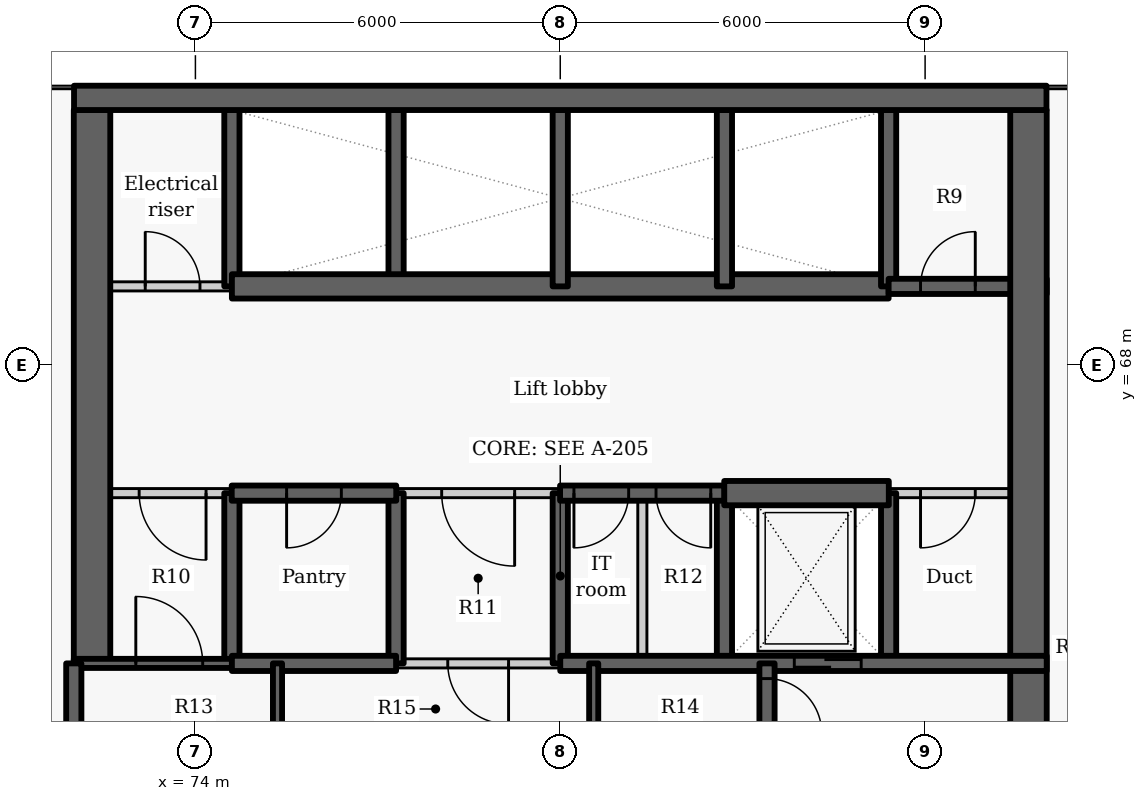
"""IFC4 building model, lengths in metres.
Left out: names, types, materials, properties, quantities, classifications, styles, units other than length and angle.
Written with IfcOpenShell. Run it as: python <this file> out.ifc"""

import sys

from ifc_helpers import new_model, si_unit, direction, frame, frame_2d, origin, place, context, subcontext, project, spatial, rectangle, extrude, element, fill, save


model = new_model("IFC4")
c1 = context("Model", 3, precision=1e-05, world=origin(), true_north=direction((0.0, 1.0)))
c2 = subcontext(c1, "Body", "Model", "MODEL_VIEW")
j1 = project(units=[si_unit("LENGTHUNIT", "METRE"), si_unit("PLANEANGLEUNIT", "RADIAN")], contexts=[c1])
p1 = place(None, origin())
s1 = spatial("IfcSite", under=j1, at=p1, CompositionType="ELEMENT")
p2 = place(p1, origin())
s2 = spatial("IfcBuilding", under=s1, at=p2, CompositionType="ELEMENT")
p3 = place(p2, frame((0.0, 0.0, 19.8)))
s3 = spatial("IfcBuildingStorey", under=s2, at=p3, CompositionType="ELEMENT", Elevation=19.8)
p4 = place(p3, frame((74.6, 63.1, -0.3), z_axis=(0.0, 0.0, 1.0), x_axis=(0.0, 1.0, 0.0)))
e1 = element("IfcWall", 1, at=p4, inside=s3, PredefinedType="SHEAR", context=c2, shape_type="SweptSolid", body=[
    extrude(rectangle(XDim=2.8, YDim=0.25, at=frame_2d((1.4, 0.0))), origin(), (0.0, 0.0, 1.0), 4.2),
])
p5 = place(p3, frame((74.6, 69.3, -0.3), z_axis=(0.0, 0.0, 1.0), x_axis=(0.0, 1.0, 0.0)))
e2 = element("IfcWall", 2, at=p5, inside=s3, PredefinedType="SHEAR", context=c2, shape_type="SweptSolid", body=[
    extrude(rectangle(XDim=2.9, YDim=0.25, at=frame_2d((1.45, 0.0))), origin(), (0.0, 0.0, 1.0), 4.2),
])
p6 = place(p3, frame((72.0, 69.3, 0.0), z_axis=(0.0, 0.0, 1.0), x_axis=(1.0, 0.0, 0.0)))
e3 = element("IfcWall", 3, at=p6, inside=s3, PredefinedType="PARTITIONING", context=c2, shape_type="SweptSolid", body=[
    extrude(rectangle(XDim=2.6, YDim=0.15, at=frame_2d((1.3, 0.0))), origin(), (0.0, 0.0, 1.0), 3.9),
])
p7 = place(p6, frame((1.175, 0.0, 0.0)))
e4 = element("IfcOpeningElement", 4, at=p7, cuts=e3, PredefinedType="OPENING", context=c2, shape_type="SweptSolid", body=[
    extrude(rectangle(XDim=0.9, YDim=2.1, at=frame_2d((0.45, 1.05))), frame((0.0, 0.085, 0.0), z_axis=(0.0, -1.0, 0.0), x_axis=(1.0, 0.0, 0.0)), (0.0, 0.0, 1.0), 0.17),
])
p8 = place(p3, frame((72.3, 63.1, -0.3), z_axis=(0.0, 0.0, 1.0), x_axis=(0.0, 1.0, 0.0)))
e5 = element("IfcWall", 5, at=p8, inside=s3, PredefinedType="SHEAR", context=c2, shape_type="SweptSolid", body=[
    extrude(rectangle(XDim=9.1, YDim=0.6, at=frame_2d((4.55, 0.0))), origin(), (0.0, 0.0, 1.0), 4.2),
])
p9 = place(p3, frame((77.3, 63.1, -0.3), z_axis=(0.0, 0.0, 1.0), x_axis=(0.0, 1.0, 0.0)))
e6 = element("IfcWall", 6, at=p9, inside=s3, PredefinedType="SHEAR", context=c2, shape_type="SweptSolid", body=[
    extrude(rectangle(XDim=2.8, YDim=0.25, at=frame_2d((1.4, 0.0))), origin(), (0.0, 0.0, 1.0), 4.2),
])
p10 = place(p3, frame((77.3, 69.3, -0.3), z_axis=(0.0, 0.0, 1.0), x_axis=(0.0, 1.0, 0.0)))
e7 = element("IfcWall", 7, at=p10, inside=s3, PredefinedType="SHEAR", context=c2, shape_type="SweptSolid", body=[
    extrude(rectangle(XDim=2.9, YDim=0.25, at=frame_2d((1.45, 0.0))), origin(), (0.0, 0.0, 1.0), 4.2),
])
p11 = place(p3, frame((74.6, 69.3, -0.3), z_axis=(0.0, 0.0, 1.0), x_axis=(1.0, 0.0, 0.0)))
e8 = element("IfcWall", 8, at=p11, inside=s3, PredefinedType="SHEAR", context=c2, shape_type="SweptSolid", body=[
    extrude(rectangle(XDim=10.8, YDim=0.4, at=frame_2d((5.4, 0.0))), origin(), (0.0, 0.0, 1.0), 4.2),
])
p12 = place(p3, frame((80.0, 63.1, -0.3), z_axis=(0.0, 0.0, 1.0), x_axis=(0.0, 1.0, 0.0)))
e9 = element("IfcWall", 9, at=p12, inside=s3, PredefinedType="SHEAR", context=c2, shape_type="SweptSolid", body=[
    extrude(rectangle(XDim=2.8, YDim=0.25, at=frame_2d((1.4, 0.0))), origin(), (0.0, 0.0, 1.0), 4.2),
])
p13 = place(p3, frame((80.0, 69.3, -0.3), z_axis=(0.0, 0.0, 1.0), x_axis=(0.0, 1.0, 0.0)))
e10 = element("IfcWall", 10, at=p13, inside=s3, PredefinedType="SHEAR", context=c2, shape_type="SweptSolid", body=[
    extrude(rectangle(XDim=2.9, YDim=0.25, at=frame_2d((1.45, 0.0))), origin(), (0.0, 0.0, 1.0), 4.2),
])
p14 = place(p3, frame((82.7, 63.1, -0.3), z_axis=(0.0, 0.0, 1.0), x_axis=(0.0, 1.0, 0.0)))
e11 = element("IfcWall", 11, at=p14, inside=s3, PredefinedType="SHEAR", context=c2, shape_type="SweptSolid", body=[
    extrude(rectangle(XDim=2.8, YDim=0.25, at=frame_2d((1.4, 0.0))), origin(), (0.0, 0.0, 1.0), 4.2),
])
p15 = place(p3, frame((82.7, 69.3, -0.3), z_axis=(0.0, 0.0, 1.0), x_axis=(0.0, 1.0, 0.0)))
e12 = element("IfcWall", 12, at=p15, inside=s3, PredefinedType="SHEAR", context=c2, shape_type="SweptSolid", body=[
    extrude(rectangle(XDim=2.9, YDim=0.25, at=frame_2d((1.45, 0.0))), origin(), (0.0, 0.0, 1.0), 4.2),
])
p16 = place(p3, frame((85.4, 63.1, -0.3), z_axis=(0.0, 0.0, 1.0), x_axis=(0.0, 1.0, 0.0)))
e13 = element("IfcWall", 13, at=p16, inside=s3, PredefinedType="SHEAR", context=c2, shape_type="SweptSolid", body=[
    extrude(rectangle(XDim=2.8, YDim=0.25, at=frame_2d((1.4, 0.0))), origin(), (0.0, 0.0, 1.0), 4.2),
])
p17 = place(p3, frame((85.4, 69.3, -0.3), z_axis=(0.0, 0.0, 1.0), x_axis=(0.0, 1.0, 0.0)))
e14 = element("IfcWall", 14, at=p17, inside=s3, PredefinedType="SHEAR", context=c2, shape_type="SweptSolid", body=[
    extrude(rectangle(XDim=2.9, YDim=0.25, at=frame_2d((1.45, 0.0))), origin(), (0.0, 0.0, 1.0), 4.2),
])
p18 = place(p3, frame((85.4, 69.3, -0.3), z_axis=(0.0, 0.0, 1.0), x_axis=(1.0, 0.0, 0.0)))
e15 = element("IfcWall", 15, at=p18, inside=s3, PredefinedType="SHEAR", context=c2, shape_type="SweptSolid", body=[
    extrude(rectangle(XDim=2.6, YDim=0.25, at=frame_2d((1.3, 0.0))), origin(), (0.0, 0.0, 1.0), 4.2),
])
p19 = place(p18, frame((0.525, 0.0, 0.3)))
e16 = element("IfcOpeningElement", 16, at=p19, cuts=e15, PredefinedType="OPENING", context=c2, shape_type="SweptSolid", body=[
    extrude(rectangle(XDim=0.9, YDim=2.1, at=frame_2d((0.45, 1.05))), frame((0.0, 0.135, 0.0), z_axis=(0.0, -1.0, 0.0), x_axis=(1.0, 0.0, 0.0)), (0.0, 0.0, 1.0), 0.27),
])
p20 = place(p3, frame((87.7, 72.2, -0.3), z_axis=(0.0, 0.0, 1.0), x_axis=(0.0, -1.0, 0.0)))
e17 = element("IfcWall", 17, at=p20, inside=s3, PredefinedType="SHEAR", context=c2, shape_type="SweptSolid", body=[
    extrude(rectangle(XDim=15.6, YDim=0.6, at=frame_2d((7.8, 0.0))), origin(), (0.0, 0.0, 1.0), 4.2),
])
p21 = place(p20, frame((11.8, 0.0, 0.3)))
e18 = element("IfcOpeningElement", 18, at=p21, cuts=e17, PredefinedType="OPENING", context=c2, shape_type="SweptSolid", body=[
    extrude(rectangle(XDim=1.1, YDim=2.1, at=frame_2d((0.55, 1.05))), frame((0.0, 0.31, 0.0), z_axis=(0.0, -1.0, 0.0), x_axis=(1.0, 0.0, 0.0)), (0.0, 0.0, 1.0), 0.62),
])
p22 = place(p3, frame((74.603, 65.9, 0.0), z_axis=(0.0, 0.0, 1.0), x_axis=(-1.0, 0.0, 0.0)))
e19 = element("IfcWall", 19, at=p22, inside=s3, PredefinedType="PARTITIONING", context=c2, shape_type="SweptSolid", body=[
    extrude(rectangle(XDim=2.603, YDim=0.15, at=frame_2d((1.302, 0.0))), origin(), (0.0, 0.0, 1.0), 3.9),
])
p23 = place(p22, frame((0.428, 0.0, 0.0)))
e20 = element("IfcOpeningElement", 20, at=p23, cuts=e19, PredefinedType="OPENING", context=c2, shape_type="SweptSolid", body=[
    extrude(rectangle(XDim=1.1, YDim=2.1, at=frame_2d((0.55, 1.05))), frame((0.0, 0.085, 0.0), z_axis=(0.0, -1.0, 0.0), x_axis=(1.0, 0.0, 0.0)), (0.0, 0.0, 1.0), 0.17),
])
p24 = place(p3, frame((80.003, 65.9, 0.0), z_axis=(0.0, 0.0, 1.0), x_axis=(-1.0, 0.0, 0.0)))
e21 = element("IfcWall", 21, at=p24, inside=s3, PredefinedType="PARTITIONING", context=c2, shape_type="SweptSolid", body=[
    extrude(rectangle(XDim=2.706, YDim=0.15, at=frame_2d((1.353, 0.0))), origin(), (0.0, 0.0, 1.0), 3.9),
])
p25 = place(p24, frame((0.753, 0.0, 0.0)))
e22 = element("IfcOpeningElement", 22, at=p25, cuts=e21, PredefinedType="OPENING", context=c2, shape_type="SweptSolid", body=[
    extrude(rectangle(XDim=1.2, YDim=2.1, at=frame_2d((0.6, 1.05))), frame((0.0, 0.085, 0.0), z_axis=(0.0, -1.0, 0.0), x_axis=(1.0, 0.0, 0.0)), (0.0, 0.0, 1.0), 0.17),
])
p26 = place(p3, frame((88.0, 65.9, 0.0), z_axis=(0.0, 0.0, 1.0), x_axis=(-1.0, 0.0, 0.0)))
e23 = element("IfcWall", 23, at=p26, inside=s3, PredefinedType="PARTITIONING", context=c2, shape_type="SweptSolid", body=[
    extrude(rectangle(XDim=2.603, YDim=0.15, at=frame_2d((1.302, 0.0))), origin(), (0.0, 0.0, 1.0), 3.9),
])
p27 = place(p26, frame((1.175, 0.0, 0.0)))
e24 = element("IfcOpeningElement", 24, at=p27, cuts=e23, PredefinedType="OPENING", context=c2, shape_type="SweptSolid", body=[
    extrude(rectangle(XDim=0.9, YDim=2.1, at=frame_2d((0.45, 1.05))), frame((0.0, 0.085, 0.0), z_axis=(0.0, -1.0, 0.0), x_axis=(1.0, 0.0, 0.0)), (0.0, 0.0, 1.0), 0.17),
])
p28 = place(p3, frame((77.303, 65.9, -0.3), z_axis=(0.0, 0.0, 1.0), x_axis=(-1.0, 0.0, 0.0)))
e25 = element("IfcWall", 25, at=p28, inside=s3, PredefinedType="SHEAR", context=c2, shape_type="SweptSolid", body=[
    extrude(rectangle(XDim=2.706, YDim=0.25, at=frame_2d((1.353, 0.0))), origin(), (0.0, 0.0, 1.0), 4.2),
])
p29 = place(p28, frame((0.903, 0.0, 0.3)))
e26 = element("IfcOpeningElement", 26, at=p29, cuts=e25, PredefinedType="OPENING", context=c2, shape_type="SweptSolid", body=[
    extrude(rectangle(XDim=0.9, YDim=2.1, at=frame_2d((0.45, 1.05))), frame((0.0, 0.135, 0.0), z_axis=(0.0, -1.0, 0.0), x_axis=(1.0, 0.0, 0.0)), (0.0, 0.0, 1.0), 0.27),
])
p30 = place(p3, frame((82.703, 65.9, -0.3), z_axis=(0.0, 0.0, 1.0), x_axis=(-1.0, 0.0, 0.0)))
e27 = element("IfcWall", 27, at=p30, inside=s3, PredefinedType="SHEAR", context=c2, shape_type="SweptSolid", body=[
    extrude(rectangle(XDim=2.706, YDim=0.25, at=frame_2d((1.353, 0.0))), origin(), (0.0, 0.0, 1.0), 4.2),
])
p31 = place(p30, frame((1.578, 0.0, 0.3)))
e28 = element("IfcOpeningElement", 28, at=p31, cuts=e27, PredefinedType="OPENING", context=c2, shape_type="SweptSolid", body=[
    extrude(rectangle(XDim=0.9, YDim=2.1, at=frame_2d((0.45, 1.05))), frame((0.0, 0.135, 0.0), z_axis=(0.0, -1.0, 0.0), x_axis=(1.0, 0.0, 0.0)), (0.0, 0.0, 1.0), 0.27),
])
p32 = place(p30, frame((0.228, 0.0, 0.3)))
e29 = element("IfcOpeningElement", 29, at=p32, cuts=e27, PredefinedType="OPENING", context=c2, shape_type="SweptSolid", body=[
    extrude(rectangle(XDim=0.9, YDim=2.1, at=frame_2d((0.45, 1.05))), frame((0.0, 0.135, 0.0), z_axis=(0.0, -1.0, 0.0), x_axis=(1.0, 0.0, 0.0)), (0.0, 0.0, 1.0), 0.27),
])
p33 = place(p3, frame((82.697, 65.9, -0.3), z_axis=(0.0, 0.0, 1.0), x_axis=(1.0, 0.0, 0.0)))
e30 = element("IfcWall", 30, at=p33, inside=s3, PredefinedType="SHEAR", context=c2, shape_type="SweptSolid", body=[
    extrude(rectangle(XDim=2.706, YDim=0.4, at=frame_2d((1.353, 0.0))), origin(), (0.0, 0.0, 1.0), 4.2),
])
p34 = place(p3, frame((72.0, 63.1, -0.3), z_axis=(0.0, 0.0, 1.0), x_axis=(1.0, 0.0, 0.0)))
e31 = element("IfcWall", 31, at=p34, inside=s3, PredefinedType="SHEAR", context=c2, shape_type="SweptSolid", body=[
    extrude(rectangle(XDim=2.6, YDim=0.15, at=frame_2d((1.3, 0.0))), origin(), (0.0, 0.0, 1.0), 4.2),
])
p35 = place(p34, frame((1.02, 0.0, 0.3)))
e32 = element("IfcOpeningElement", 32, at=p35, cuts=e31, PredefinedType="OPENING", context=c2, shape_type="SweptSolid", body=[
    extrude(rectangle(XDim=1.1, YDim=2.1, at=frame_2d((0.55, 1.05))), frame((0.0, 0.085, 0.0), z_axis=(0.0, -1.0, 0.0), x_axis=(1.0, 0.0, 0.0)), (0.0, 0.0, 1.0), 0.17),
])
p36 = place(p3, frame((74.6, 63.1, -0.3), z_axis=(0.0, 0.0, 1.0), x_axis=(1.0, 0.0, 0.0)))
e33 = element("IfcWall", 33, at=p36, inside=s3, PredefinedType="SHEAR", context=c2, shape_type="SweptSolid", body=[
    extrude(rectangle(XDim=2.7, YDim=0.25, at=frame_2d((1.35, 0.0))), origin(), (0.0, 0.0, 1.0), 4.2),
])
p37 = place(p3, frame((80.0, 63.1, -0.3), z_axis=(0.0, 0.0, 1.0), x_axis=(1.0, 0.0, 0.0)))
e34 = element("IfcWall", 34, at=p37, inside=s3, PredefinedType="SHEAR", context=c2, shape_type="SweptSolid", body=[
    extrude(rectangle(XDim=8.0, YDim=0.25, at=frame_2d((4.0, 0.0))), origin(), (0.0, 0.0, 1.0), 4.2),
])
p38 = place(p37, frame((3.849, 0.0, 0.3)))
e35 = element("IfcOpeningElement", 35, at=p38, cuts=e34, PredefinedType="OPENING", context=c2, shape_type="SweptSolid", body=[
    extrude(rectangle(XDim=1.1, YDim=2.1, at=frame_2d((0.55, 1.05))), frame((0.0, 0.135, 0.0), z_axis=(0.0, -1.0, 0.0), x_axis=(1.0, 0.0, 0.0)), (0.0, 0.0, 1.0), 0.27),
])
p39 = place(p3, frame((80.0, 63.1, 0.0), z_axis=(0.0, 0.0, 1.0), x_axis=(-1.0, 0.0, 0.0)))
e36 = element("IfcWall", 36, at=p39, inside=s3, PredefinedType="PARTITIONING", context=c2, shape_type="SweptSolid", body=[
    extrude(rectangle(XDim=2.7, YDim=0.15, at=frame_2d((1.35, 0.0))), origin(), (0.0, 0.0, 1.0), 3.9),
])
p40 = place(p39, frame((0.85, 0.0, 0.0)))
e37 = element("IfcOpeningElement", 37, at=p40, cuts=e36, PredefinedType="OPENING", context=c2, shape_type="SweptSolid", body=[
    extrude(rectangle(XDim=1.0, YDim=2.1, at=frame_2d((0.5, 1.05))), frame((0.0, 0.085, 0.0), z_axis=(0.0, -1.0, 0.0), x_axis=(1.0, 0.0, 0.0)), (0.0, 0.0, 1.0), 0.17),
])
p41 = place(p3, frame((81.35, 63.1, 0.0), z_axis=(0.0, 0.0, 1.0), x_axis=(0.0, 1.0, 0.0)))
e38 = element("IfcWall", 38, at=p41, inside=s3, PredefinedType="PARTITIONING", context=c2, shape_type="SweptSolid", body=[
    extrude(rectangle(XDim=2.8, YDim=0.15, at=frame_2d((1.4, 0.0))), origin(), (0.0, 0.0, 1.0), 3.9),
])
p42 = place(p3, frame((75.35, 61.597, -0.3), z_axis=(0.0, 0.0, 1.0), x_axis=(0.0, 1.0, 0.0)))
e39 = element("IfcWall", 39, at=p42, inside=s3, PredefinedType="SHEAR", context=c2, shape_type="SweptSolid", body=[
    extrude(rectangle(XDim=1.503, YDim=0.15, at=frame_2d((0.751, 0.0))), origin(), (0.0, 0.0, 1.0), 4.2),
])
p43 = place(p3, frame((72.0, 56.6, -0.3), z_axis=(0.0, 0.0, 1.0), x_axis=(0.0, 1.0, 0.0)))
e40 = element("IfcWall", 40, at=p43, inside=s3, PredefinedType="SHEAR", context=c2, shape_type="SweptSolid", body=[
    extrude(rectangle(XDim=6.5, YDim=0.25, at=frame_2d((3.25, 0.0))), origin(), (0.0, 0.0, 1.0), 4.2),
])
p44 = place(p3, frame((83.4, 63.1, -0.3), z_axis=(0.0, 0.0, 1.0), x_axis=(0.0, -1.0, 0.0)))
e41 = element("IfcWall", 41, at=p44, inside=s3, PredefinedType="SHEAR", context=c2, shape_type="SweptSolid", body=[
    extrude(rectangle(XDim=6.5, YDim=0.25, at=frame_2d((3.25, 0.0))), origin(), (0.0, 0.0, 1.0), 4.2),
])
p45 = place(p44, frame((0.25, 0.0, 0.3)))
e42 = element("IfcOpeningElement", 42, at=p45, cuts=e41, PredefinedType="OPENING", context=c2, shape_type="SweptSolid", body=[
    extrude(rectangle(XDim=0.9, YDim=2.1, at=frame_2d((0.45, 1.05))), frame((0.0, 0.135, 0.0), z_axis=(0.0, -1.0, 0.0), x_axis=(1.0, 0.0, 0.0)), (0.0, 0.0, 1.0), 0.27),
])
p46 = place(p3, frame((80.55, 61.597, -0.3), z_axis=(0.0, 0.0, 1.0), x_axis=(0.0, 1.0, 0.0)))
e43 = element("IfcWall", 43, at=p46, inside=s3, PredefinedType="SHEAR", context=c2, shape_type="SweptSolid", body=[
    extrude(rectangle(XDim=1.503, YDim=0.15, at=frame_2d((0.751, 0.0))), origin(), (0.0, 0.0, 1.0), 4.2),
])
p47 = place(p3, frame((72.004, 72.4, -0.3), z_axis=(0.0, 0.0, 1.0), x_axis=(1.0, 0.0, 0.0)))
e44 = element("IfcWall", 44, at=p47, inside=s3, PredefinedType="SHEAR", context=c2, shape_type="SweptSolid", body=[
    extrude(rectangle(XDim=15.992, YDim=0.4, at=frame_2d((7.996, 0.0))), origin(), (0.0, 0.0, 1.0), 4.2),
])
p48 = place(p7, origin())
e45 = element("IfcDoor", 45, at=p48, inside=s3, OperationType="SINGLE_SWING_LEFT", PredefinedType="DOOR", context=c2, shape_type="SweptSolid", body=[
    extrude(rectangle(XDim=0.9, YDim=2.1, at=frame_2d((0.45, 1.05))), frame((0.0, 0.025, 0.0), z_axis=(0.0, -1.0, 0.0), x_axis=(1.0, 0.0, 0.0)), (0.0, 0.0, 1.0), 0.05),
])
fill(e4, e45)
p49 = place(p19, origin())
e46 = element("IfcDoor", 46, at=p49, inside=s3, OperationType="SINGLE_SWING_RIGHT", PredefinedType="DOOR", context=c2, shape_type="SweptSolid", body=[
    extrude(rectangle(XDim=0.9, YDim=2.1, at=frame_2d((0.45, 1.05))), frame((0.0, 0.025, 0.0), z_axis=(0.0, -1.0, 0.0), x_axis=(1.0, 0.0, 0.0)), (0.0, 0.0, 1.0), 0.05),
])
fill(e16, e46)
p50 = place(p23, origin())
e47 = element("IfcDoor", 47, at=p50, inside=s3, OperationType="SINGLE_SWING_LEFT", PredefinedType="DOOR", context=c2, shape_type="SweptSolid", body=[
    extrude(rectangle(XDim=1.1, YDim=2.1, at=frame_2d((0.55, 1.05))), frame((0.0, 0.025, 0.0), z_axis=(0.0, -1.0, 0.0), x_axis=(1.0, 0.0, 0.0)), (0.0, 0.0, 1.0), 0.05),
])
fill(e20, e47)
p51 = place(p29, origin())
e48 = element("IfcDoor", 48, at=p51, inside=s3, OperationType="SINGLE_SWING_RIGHT", PredefinedType="DOOR", context=c2, shape_type="SweptSolid", body=[
    extrude(rectangle(XDim=0.9, YDim=2.1, at=frame_2d((0.45, 1.05))), frame((0.0, 0.025, 0.0), z_axis=(0.0, -1.0, 0.0), x_axis=(1.0, 0.0, 0.0)), (0.0, 0.0, 1.0), 0.05),
])
fill(e26, e48)
p52 = place(p25, origin())
e49 = element("IfcDoor", 49, at=p52, inside=s3, OperationType="DOUBLE_DOOR_SINGLE_SWING", PredefinedType="DOOR", context=c2, shape_type="SweptSolid", body=[
    extrude(rectangle(XDim=1.2, YDim=2.1, at=frame_2d((0.6, 1.05))), frame((0.0, 0.025, 0.0), z_axis=(0.0, -1.0, 0.0), x_axis=(1.0, 0.0, 0.0)), (0.0, 0.0, 1.0), 0.05),
])
fill(e22, e49)
p53 = place(p31, origin())
e50 = element("IfcDoor", 50, at=p53, inside=s3, OperationType="SINGLE_SWING_RIGHT", PredefinedType="DOOR", context=c2, shape_type="SweptSolid", body=[
    extrude(rectangle(XDim=0.9, YDim=2.1, at=frame_2d((0.45, 1.05))), frame((0.0, 0.025, 0.0), z_axis=(0.0, -1.0, 0.0), x_axis=(1.0, 0.0, 0.0)), (0.0, 0.0, 1.0), 0.05),
])
fill(e28, e50)
p54 = place(p32, origin())
e51 = element("IfcDoor", 51, at=p54, inside=s3, OperationType="SINGLE_SWING_LEFT", PredefinedType="DOOR", context=c2, shape_type="SweptSolid", body=[
    extrude(rectangle(XDim=0.9, YDim=2.1, at=frame_2d((0.45, 1.05))), frame((0.0, 0.025, 0.0), z_axis=(0.0, -1.0, 0.0), x_axis=(1.0, 0.0, 0.0)), (0.0, 0.0, 1.0), 0.05),
])
fill(e29, e51)
p55 = place(p38, origin())
e52 = element("IfcDoor", 52, at=p55, inside=s3, OperationType="SLIDING_TO_LEFT", PredefinedType="DOOR", context=c2, shape_type="SweptSolid", body=[
    extrude(rectangle(XDim=1.1, YDim=2.1, at=frame_2d((0.55, 1.05))), frame((0.0, 0.025, 0.0), z_axis=(0.0, -1.0, 0.0), x_axis=(1.0, 0.0, 0.0)), (0.0, 0.0, 1.0), 0.05),
])
fill(e35, e52)
p56 = place(p27, origin())
e53 = element("IfcDoor", 53, at=p56, inside=s3, OperationType="SINGLE_SWING_RIGHT", PredefinedType="DOOR", context=c2, shape_type="SweptSolid", body=[
    extrude(rectangle(XDim=0.9, YDim=2.1, at=frame_2d((0.45, 1.05))), frame((0.0, 0.025, 0.0), z_axis=(0.0, -1.0, 0.0), x_axis=(1.0, 0.0, 0.0)), (0.0, 0.0, 1.0), 0.05),
])
fill(e24, e53)
p57 = place(p40, origin())
e54 = element("IfcDoor", 54, at=p57, inside=s3, OperationType="SINGLE_SWING_LEFT", PredefinedType="DOOR", context=c2, shape_type="SweptSolid", body=[
    extrude(rectangle(XDim=1.0, YDim=2.1, at=frame_2d((0.5, 1.05))), frame((0.0, 0.025, 0.0), z_axis=(0.0, -1.0, 0.0), x_axis=(1.0, 0.0, 0.0)), (0.0, 0.0, 1.0), 0.05),
])
fill(e37, e54)
p58 = place(p35, origin())
e55 = element("IfcDoor", 55, at=p58, inside=s3, OperationType="SINGLE_SWING_LEFT", PredefinedType="DOOR", context=c2, shape_type="SweptSolid", body=[
    extrude(rectangle(XDim=1.1, YDim=2.1, at=frame_2d((0.55, 1.05))), frame((0.0, 0.025, 0.0), z_axis=(0.0, -1.0, 0.0), x_axis=(1.0, 0.0, 0.0)), (0.0, 0.0, 1.0), 0.05),
])
fill(e32, e55)
p59 = place(p45, origin())
e56 = element("IfcDoor", 56, at=p59, inside=s3, OperationType="SINGLE_SWING_RIGHT", PredefinedType="DOOR", context=c2, shape_type="SweptSolid", body=[
    extrude(rectangle(XDim=0.9, YDim=2.1, at=frame_2d((0.45, 1.05))), frame((0.0, 0.025, 0.0), z_axis=(0.0, -1.0, 0.0), x_axis=(1.0, 0.0, 0.0)), (0.0, 0.0, 1.0), 0.05),
])
fill(e42, e56)
save(model, sys.argv[1])
